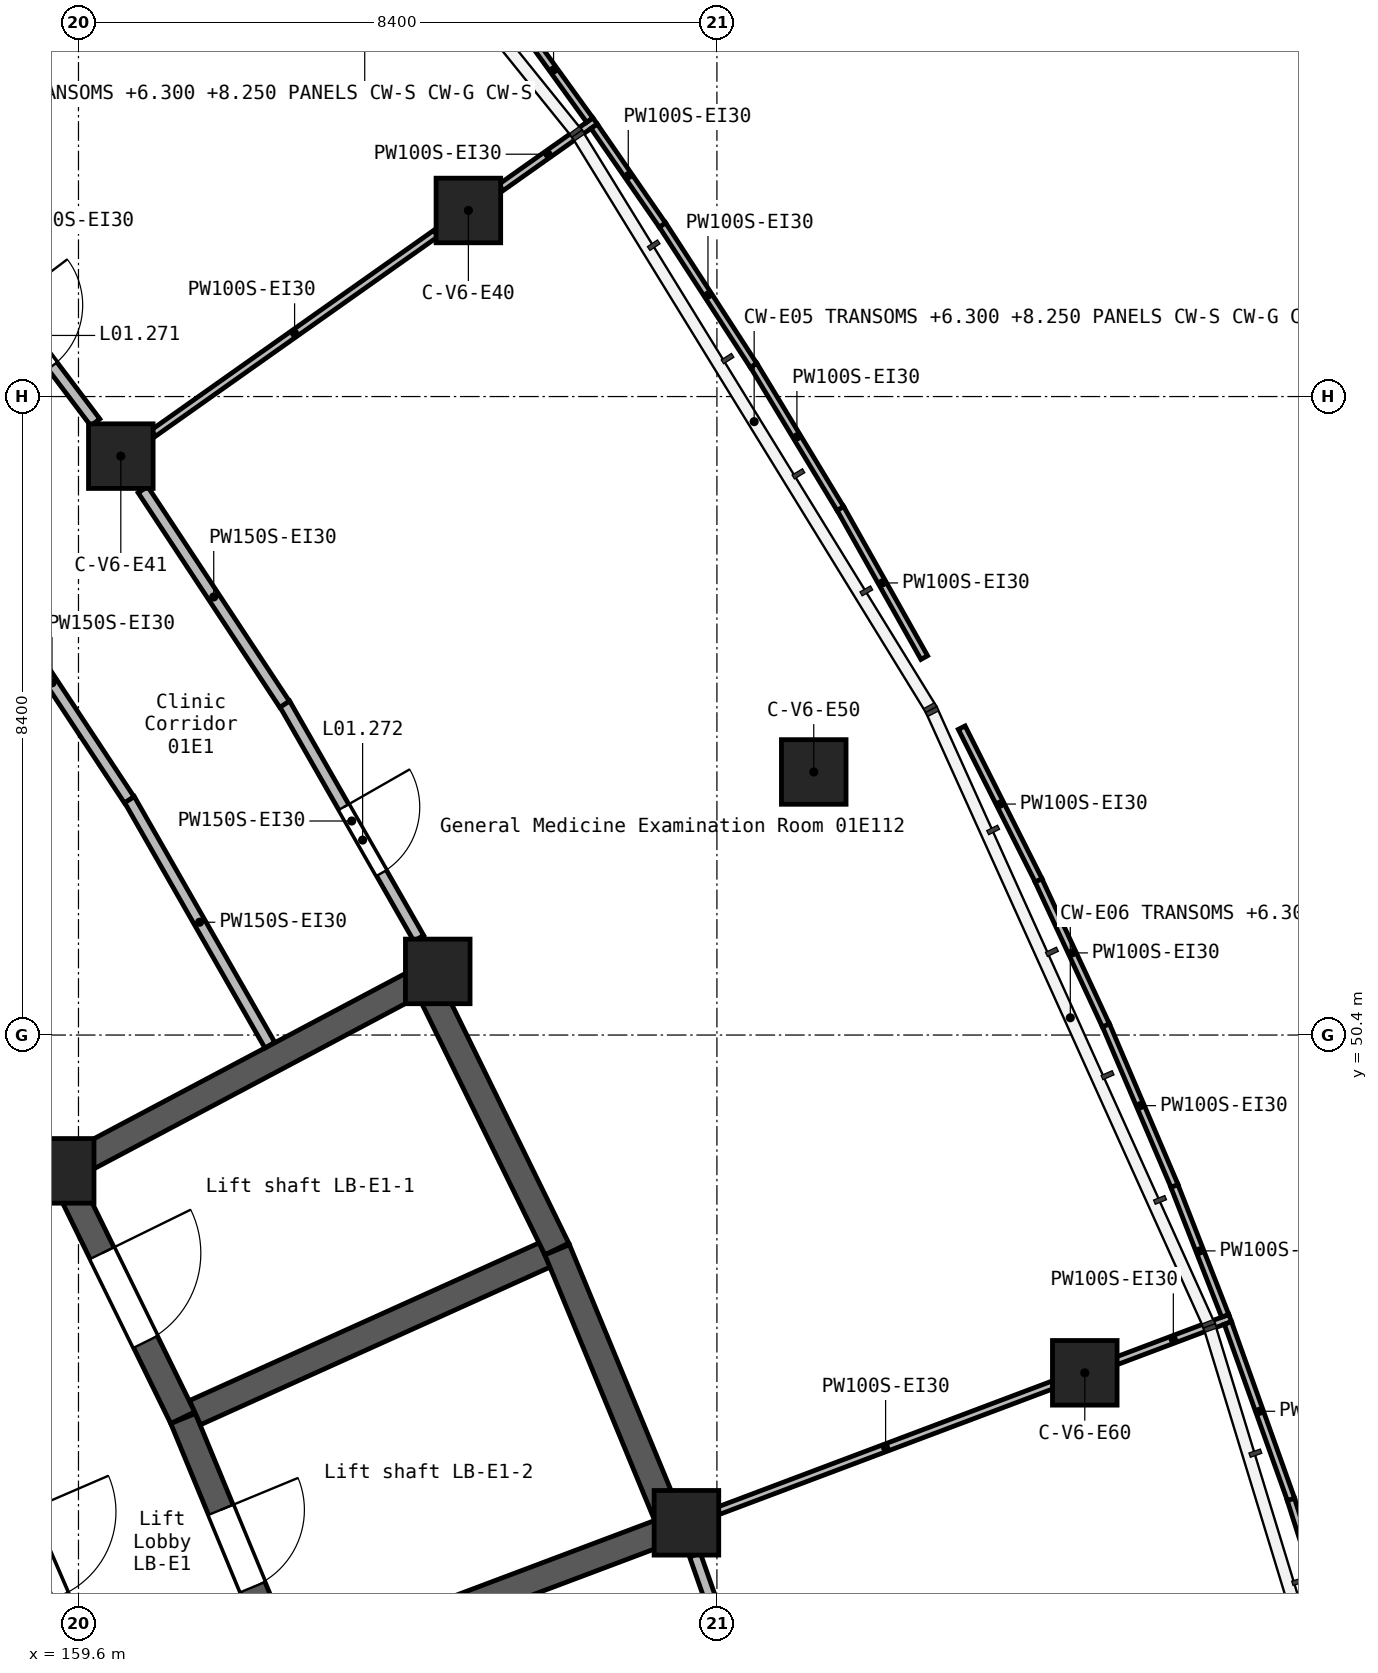
"""IFC4 building model, lengths in metres.
Left out: names, types, materials, properties, quantities, classifications, styles, units other than length and angle.
Written with IfcOpenShell. Run it as: python <this file> out.ifc"""

import sys

from ifc_helpers import new_model, si_unit, direction, frame, frame_2d, origin, origin_2d, place, context, subcontext, project, spatial, rectangle, extrude, element, fill, save


model = new_model("IFC4")
c1 = context("Model", 3, precision=1e-05, world=origin(), true_north=direction((0.0, 1.0)))
c2 = subcontext(c1, "Body", "Model", "MODEL_VIEW")
j1 = project(units=[si_unit("LENGTHUNIT", "METRE"), si_unit("PLANEANGLEUNIT", "RADIAN")], contexts=[c1])
p1 = place(None, origin())
s1 = spatial("IfcSite", under=j1, at=p1, CompositionType="ELEMENT")
p2 = place(p1, origin())
s2 = spatial("IfcBuilding", under=s1, at=p2, CompositionType="ELEMENT")
p3 = place(p2, frame((0.0, 0.0, 5.4)))
s3 = spatial("IfcBuildingStorey", under=s2, at=p3, CompositionType="ELEMENT", Elevation=5.4)
for number, where, z_axis, x_axis in (
    (1, (159.379, 48.613, 0.0), (0.0, 0.0, 1.0), (1.0, 0.0, 0.0)),
    (2, (160.157, 58.016, 0.0), (0.0, 0.0, 1.0), (1.0, 0.0, 0.0)),
    (3, (164.327, 51.237, 0.0), (0.0, 0.0, 1.0), (1.0, 0.0, 0.0)),
    (4, (164.73, 61.248, 0.0), (0.0, 0.0, 1.0), (1.0, 0.0, 0.0)),
    (5, (167.599, 43.983, 0.0), (0.0, 0.0, 1.0), (1.0, 0.0, 0.0)),
    (6, (169.274, 53.861, 0.0), (0.0, 0.0, 1.0), (1.0, 0.0, 0.0)),
    (7, (172.84, 45.956, 0.0), (0.0, 0.0, 1.0), (1.0, 0.0, 0.0)),
):
    element("IfcColumn", number, at=place(p3, frame(where, z_axis=z_axis, x_axis=x_axis)), inside=s3, PredefinedType="COLUMN", context=c2, shape_type="SweptSolid", body=[
        extrude(rectangle(XDim=0.85, YDim=0.85, at=origin_2d()), origin(), (0.0, 0.0, 1.0), 4.5),
    ])
p4 = place(p3, frame((159.224, 48.531, 0.0), z_axis=(0.0, 0.0, 1.0), x_axis=(0.883393138637, 0.468632652094, 0.0)))
e8 = element("IfcWall", 8, at=p4, inside=s3, PredefinedType="SHEAR", context=c2, shape_type="SweptSolid", body=[
    extrude(rectangle(XDim=5.751, YDim=0.35, at=frame_2d((2.875, 0.0))), origin(), (0.0, 0.0, 1.0), 4.5),
])
p5 = place(p3, frame((159.456, 48.456, 0.0), z_axis=(0.0, 0.0, 1.0), x_axis=(0.440221126053, -0.89788939195, 0.0)))
e9 = element("IfcWall", 9, at=p5, inside=s3, PredefinedType="SHEAR", context=c2, shape_type="SweptSolid", body=[
    extrude(rectangle(XDim=3.442, YDim=0.35, at=frame_2d((1.721, 0.0))), origin(), (0.0, 0.0, 1.0), 4.5),
])
p6 = place(p5, frame((1.031, 0.0, 0.0)))
e10 = element("IfcOpeningElement", 10, at=p6, cuts=e9, PredefinedType="OPENING", context=c2, shape_type="SweptSolid", body=[
    extrude(rectangle(XDim=1.3, YDim=2.1, at=frame_2d((0.65, 1.05))), frame((0.0, 0.185, 0.0), z_axis=(0.0, -1.0, 0.0), x_axis=(1.0, 0.0, 0.0)), (0.0, 0.0, 1.0), 0.37),
])
p7 = place(p3, frame((160.976, 45.355, 0.0), z_axis=(0.0, 0.0, 1.0), x_axis=(0.381990591944, -0.924166212143, 0.0)))
e11 = element("IfcWall", 11, at=p7, inside=s3, PredefinedType="SHEAR", context=c2, shape_type="SweptSolid", body=[
    extrude(rectangle(XDim=3.443, YDim=0.35, at=frame_2d((1.721, 0.0))), origin(), (0.0, 0.0, 1.0), 4.5),
])
p8 = place(p7, frame((1.3, 0.0, 0.0)))
e12 = element("IfcOpeningElement", 12, at=p8, cuts=e11, PredefinedType="OPENING", context=c2, shape_type="SweptSolid", body=[
    extrude(rectangle(XDim=1.1, YDim=2.1, at=frame_2d((0.55, 1.05))), frame((0.0, 0.185, 0.0), z_axis=(0.0, -1.0, 0.0), x_axis=(1.0, 0.0, 0.0)), (0.0, 0.0, 1.0), 0.37),
])
p9 = place(p3, frame((161.134, 45.432, 0.0), z_axis=(0.0, 0.0, 1.0), x_axis=(0.911564728385, 0.411156595427, 0.0)))
e13 = element("IfcWall", 13, at=p9, inside=s3, PredefinedType="SHEAR", context=c2, shape_type="SweptSolid", body=[
    extrude(rectangle(XDim=5.05, YDim=0.35, at=frame_2d((2.525, 0.0))), origin(), (0.0, 0.0, 1.0), 4.5),
])
p10 = place(p3, frame((162.194, 41.949, 0.0), z_axis=(0.0, 0.0, 1.0), x_axis=(0.935920223106, 0.352212061095, 0.0)))
e14 = element("IfcWall", 14, at=p10, inside=s3, PredefinedType="SHEAR", context=c2, shape_type="SweptSolid", body=[
    extrude(rectangle(XDim=5.75, YDim=0.35, at=frame_2d((2.875, 0.0))), origin(), (0.0, 0.0, 1.0), 4.5),
])
p11 = place(p3, frame((165.894, 47.585, 0.0), z_axis=(0.0, 0.0, 1.0), x_axis=(-0.43992897418, 0.898032570499, 0.0)))
e15 = element("IfcWall", 15, at=p11, inside=s3, PredefinedType="SHEAR", context=c2, shape_type="SweptSolid", body=[
    extrude(rectangle(XDim=3.788, YDim=0.35, at=frame_2d((1.894, 0.0))), origin(), (0.0, 0.0, 1.0), 4.5),
])
p12 = place(p3, frame((167.345, 44.075, 0.0), z_axis=(0.0, 0.0, 1.0), x_axis=(-0.382046231428, 0.924143212415, 0.0)))
e16 = element("IfcWall", 16, at=p12, inside=s3, PredefinedType="SHEAR", context=c2, shape_type="SweptSolid", body=[
    extrude(rectangle(XDim=3.788, YDim=0.35, at=frame_2d((1.894, 0.0))), origin(), (0.0, 0.0, 1.0), 4.5),
])
p13 = place(p3, frame((158.747, 44.465, 0.0), z_axis=(0.0, 0.0, 1.0), x_axis=(0.396322487651, -0.918111368943, 0.0)))
e17 = element("IfcWall", 17, at=p13, inside=s3, PredefinedType="SOLIDWALL", context=c2, shape_type="SweptSolid", body=[
    extrude(rectangle(XDim=1.936, YDim=0.2, at=frame_2d((0.968, 0.0))), origin(), (0.0, 0.0, 1.0), 4.15),
])
p14 = place(p13, frame((0.368, 0.0, 0.0)))
e18 = element("IfcOpeningElement", 18, at=p14, cuts=e17, PredefinedType="OPENING", context=c2, shape_type="SweptSolid", body=[
    extrude(rectangle(XDim=1.2, YDim=2.1, at=frame_2d((0.6, 1.05))), frame((0.0, 0.11, 0.0), z_axis=(0.0, -1.0, 0.0), x_axis=(1.0, 0.0, 0.0)), (0.0, 0.0, 1.0), 0.22),
])
p15 = place(p3, frame((162.313, 54.758, 0.0), z_axis=(0.0, 0.0, 1.0), x_axis=(0.496582798362, -0.867989357291, 0.0)))
e19 = element("IfcWall", 19, at=p15, inside=s3, PredefinedType="PARTITIONING", context=c2, shape_type="SweptSolid", body=[
    extrude(rectangle(XDim=3.553, YDim=0.15, at=frame_2d((1.777, 0.0))), origin(), (0.0, 0.0, 1.0), 4.15),
])
p16 = place(p15, frame((1.566, 0.0, 0.0)))
e20 = element("IfcOpeningElement", 20, at=p16, cuts=e19, PredefinedType="OPENING", context=c2, shape_type="SweptSolid", body=[
    extrude(rectangle(XDim=1.0, YDim=2.1, at=frame_2d((0.5, 1.05))), frame((0.0, 0.085, 0.0), z_axis=(0.0, -1.0, 0.0), x_axis=(1.0, 0.0, 0.0)), (0.0, 0.0, 1.0), 0.17),
])
p17 = place(p3, frame((160.448, 57.575, 0.0), z_axis=(0.0, 0.0, 1.0), x_axis=(0.550814058929, -0.834627984485, 0.0)))
e21 = element("IfcWall", 21, at=p17, inside=s3, PredefinedType="PARTITIONING", context=c2, shape_type="SweptSolid", body=[
    extrude(rectangle(XDim=3.383, YDim=0.15, at=frame_2d((1.692, 0.0))), origin(), (0.0, 0.0, 1.0), 4.15),
])
p18 = place(p3, frame((157.712, 61.252, 0.0), z_axis=(0.0, 0.0, 1.0), x_axis=(0.602876520925, -0.797834506974, 0.0)))
e22 = element("IfcWall", 22, at=p18, inside=s3, PredefinedType="PARTITIONING", context=c2, shape_type="SweptSolid", body=[
    extrude(rectangle(XDim=3.499, YDim=0.15, at=frame_2d((1.75, 0.0))), origin(), (0.0, 0.0, 1.0), 4.15),
])
p19 = place(p18, frame((1.565, 0.0, 0.0)))
e23 = element("IfcOpeningElement", 23, at=p19, cuts=e22, PredefinedType="OPENING", context=c2, shape_type="SweptSolid", body=[
    extrude(rectangle(XDim=1.0, YDim=2.1, at=frame_2d((0.5, 1.05))), frame((0.0, 0.085, 0.0), z_axis=(0.0, -1.0, 0.0), x_axis=(1.0, 0.0, 0.0)), (0.0, 0.0, 1.0), 0.17),
])
p20 = place(p3, frame((167.711, 43.559, 0.0), z_axis=(0.0, 0.0, 1.0), x_axis=(0.330491338893, -0.9438090246, 0.0)))
e24 = element("IfcWall", 24, at=p20, inside=s3, PredefinedType="PARTITIONING", context=c2, shape_type="SweptSolid", body=[
    extrude(rectangle(XDim=3.473, YDim=0.15, at=frame_2d((1.736, 0.0))), origin(), (0.0, 0.0, 1.0), 4.15),
])
p21 = place(p3, frame((160.269, 53.501, 0.0), z_axis=(0.0, 0.0, 1.0), x_axis=(0.496371795626, -0.8681100394, 0.0)))
e25 = element("IfcWall", 25, at=p21, inside=s3, PredefinedType="PARTITIONING", context=c2, shape_type="SweptSolid", body=[
    extrude(rectangle(XDim=3.726, YDim=0.15, at=frame_2d((1.863, 0.0))), origin(), (0.0, 0.0, 1.0), 4.15),
])
p22 = place(p3, frame((158.236, 56.571, 0.0), z_axis=(0.0, 0.0, 1.0), x_axis=(0.550996276136, -0.834507701393, 0.0)))
e26 = element("IfcWall", 26, at=p22, inside=s3, PredefinedType="PARTITIONING", context=c2, shape_type="SweptSolid", body=[
    extrude(rectangle(XDim=3.687, YDim=0.15, at=frame_2d((1.843, 0.0))), origin(), (0.0, 0.0, 1.0), 4.15),
])
p23 = place(p3, frame((168.016, 44.14, 0.0), z_axis=(0.0, 0.0, 1.0), x_axis=(0.935850976525, 0.352396012659, 0.0)))
e27 = element("IfcWall", 27, at=p23, inside=s3, PredefinedType="PARTITIONING", context=c2, shape_type="SweptSolid", body=[
    extrude(rectangle(XDim=4.708, YDim=0.1, at=frame_2d((2.354, 0.0))), origin(), (0.0, 0.0, 1.0), 4.15),
])
p24 = place(p3, frame((173.257, 46.114, 0.0), z_axis=(0.0, 0.0, 1.0), x_axis=(0.93586999438, 0.35234550319, 0.0)))
e28 = element("IfcWall", 28, at=p24, inside=s3, PredefinedType="PARTITIONING", context=c2, shape_type="SweptSolid", body=[
    extrude(rectangle(XDim=1.598, YDim=0.1, at=frame_2d((0.799, 0.0))), origin(), (0.0, 0.0, 1.0), 4.15),
])
p25 = place(p3, frame((160.585, 58.319, 0.0), z_axis=(0.0, 0.0, 1.0), x_axis=(0.816630246187, 0.577161191534, 0.0)))
e29 = element("IfcWall", 29, at=p25, inside=s3, PredefinedType="PARTITIONING", context=c2, shape_type="SweptSolid", body=[
    extrude(rectangle(XDim=4.551, YDim=0.1, at=frame_2d((2.275, 0.0))), origin(), (0.0, 0.0, 1.0), 4.15),
])
p26 = place(p3, frame((165.158, 61.551, 0.0), z_axis=(0.0, 0.0, 1.0), x_axis=(0.816659911288, 0.577119215842, 0.0)))
e30 = element("IfcWall", 30, at=p26, inside=s3, PredefinedType="PARTITIONING", context=c2, shape_type="SweptSolid", body=[
    extrude(rectangle(XDim=1.517, YDim=0.1, at=frame_2d((0.758, 0.0))), origin(), (0.0, 0.0, 1.0), 4.15),
])
p27 = place(p3, frame((174.723, 46.611, 0.0), z_axis=(0.0, 0.0, 1.0), x_axis=(0.336762779461, -0.94158952329, 0.0)))
e31 = element("IfcWall", 31, at=p27, inside=s3, PredefinedType="PARTITIONING", context=c2, shape_type="SweptSolid", body=[
    extrude(rectangle(XDim=2.466, YDim=0.1, at=frame_2d((1.233, 0.0))), origin(), (0.0, 0.0, 1.0), 4.15),
])
p28 = place(p3, frame((169.624, 57.33, 0.0), z_axis=(0.0, 0.0, 1.0), x_axis=(0.490245804698, -0.871584219095, 0.0)))
e32 = element("IfcWall", 32, at=p28, inside=s3, PredefinedType="PARTITIONING", context=c2, shape_type="SweptSolid", body=[
    extrude(rectangle(XDim=2.253, YDim=0.1, at=frame_2d((1.126, 0.0))), origin(), (0.0, 0.0, 1.0), 4.15),
])
p29 = place(p3, frame((168.482, 59.213, 0.0), z_axis=(0.0, 0.0, 1.0), x_axis=(0.517604223091, -0.855620165867, 0.0)))
e33 = element("IfcWall", 33, at=p29, inside=s3, PredefinedType="PARTITIONING", context=c2, shape_type="SweptSolid", body=[
    extrude(rectangle(XDim=2.204, YDim=0.1, at=frame_2d((1.102, 0.0))), origin(), (0.0, 0.0, 1.0), 4.15),
])
p30 = place(p3, frame((167.283, 61.059, 0.0), z_axis=(0.0, 0.0, 1.0), x_axis=(0.544248024884, -0.838924363342, 0.0)))
e34 = element("IfcWall", 34, at=p30, inside=s3, PredefinedType="PARTITIONING", context=c2, shape_type="SweptSolid", body=[
    extrude(rectangle(XDim=2.203, YDim=0.1, at=frame_2d((1.102, 0.0))), origin(), (0.0, 0.0, 1.0), 4.15),
])
p31 = place(p3, frame((171.221, 54.444, 0.0), z_axis=(0.0, 0.0, 1.0), x_axis=(0.449727785834, -0.893165672565, 0.0)))
e35 = element("IfcWall", 35, at=p31, inside=s3, PredefinedType="PARTITIONING", context=c2, shape_type="SweptSolid", body=[
    extrude(rectangle(XDim=2.251, YDim=0.1, at=frame_2d((1.125, 0.0))), origin(), (0.0, 0.0, 1.0), 4.15),
])
p32 = place(p3, frame((173.118, 50.529, 0.0), z_axis=(0.0, 0.0, 1.0), x_axis=(0.392535641105, -0.919736794122, 0.0)))
e36 = element("IfcWall", 36, at=p32, inside=s3, PredefinedType="PARTITIONING", context=c2, shape_type="SweptSolid", body=[
    extrude(rectangle(XDim=2.301, YDim=0.1, at=frame_2d((1.15, 0.0))), origin(), (0.0, 0.0, 1.0), 4.15),
])
p33 = place(p3, frame((175.552, 44.29, 0.0), z_axis=(0.0, 0.0, 1.0), x_axis=(0.304461914253, -0.952524510325, 0.0)))
e37 = element("IfcWall", 37, at=p33, inside=s3, PredefinedType="PARTITIONING", context=c2, shape_type="SweptSolid", body=[
    extrude(rectangle(XDim=2.202, YDim=0.1, at=frame_2d((1.101, 0.0))), origin(), (0.0, 0.0, 1.0), 4.15),
])
p34 = place(p3, frame((172.231, 52.434, 0.0), z_axis=(0.0, 0.0, 1.0), x_axis=(0.42144215668, -0.906855285353, 0.0)))
e38 = element("IfcWall", 38, at=p34, inside=s3, PredefinedType="PARTITIONING", context=c2, shape_type="SweptSolid", body=[
    extrude(rectangle(XDim=2.103, YDim=0.1, at=frame_2d((1.051, 0.0))), origin(), (0.0, 0.0, 1.0), 4.15),
])
p35 = place(p3, frame((174.02, 48.414, 0.0), z_axis=(0.0, 0.0, 1.0), x_axis=(0.364148326517, -0.931340966722, 0.0)))
e39 = element("IfcWall", 39, at=p35, inside=s3, PredefinedType="PARTITIONING", context=c2, shape_type="SweptSolid", body=[
    extrude(rectangle(XDim=1.834, YDim=0.1, at=frame_2d((0.917, 0.0))), origin(), (0.0, 0.0, 1.0), 4.15),
])
p36 = place(p3, frame((166.385, 62.355, 0.0), z_axis=(0.0, 0.0, 1.0), x_axis=(0.568646920536, -0.822581716163, 0.0)))
e40 = element("IfcWall", 40, at=p36, inside=s3, PredefinedType="PARTITIONING", context=c2, shape_type="SweptSolid", body=[
    extrude(rectangle(XDim=1.579, YDim=0.1, at=frame_2d((0.789, 0.0))), origin(), (0.0, 0.0, 1.0), 4.15),
])
p37 = place(p3, frame((165.375, 63.755, 0.0), z_axis=(0.0, 0.0, 1.0), x_axis=(0.585622227381, -0.810584114573, 0.0)))
e41 = element("IfcWall", 41, at=p37, inside=s3, PredefinedType="PARTITIONING", context=c2, shape_type="SweptSolid", body=[
    extrude(rectangle(XDim=1.625, YDim=0.1, at=frame_2d((0.812, 0.0))), origin(), (0.0, 0.0, 1.0), 4.15),
])
p38 = place(p14, origin())
e42 = element("IfcDoor", 42, at=p38, inside=s3, OperationType="SINGLE_SWING_LEFT", PredefinedType="DOOR", context=c2, shape_type="SweptSolid", body=[
    extrude(rectangle(XDim=1.2, YDim=2.1, at=frame_2d((0.6, 1.05))), frame((0.0, 0.025, 0.0), z_axis=(0.0, -1.0, 0.0), x_axis=(1.0, 0.0, 0.0)), (0.0, 0.0, 1.0), 0.05),
])
fill(e18, e42)
p39 = place(p19, origin())
e43 = element("IfcDoor", 43, at=p39, inside=s3, OperationType="SINGLE_SWING_RIGHT", PredefinedType="DOOR", context=c2, shape_type="SweptSolid", body=[
    extrude(rectangle(XDim=1.0, YDim=2.1, at=frame_2d((0.5, 1.05))), frame((0.0, 0.025, 0.0), z_axis=(0.0, -1.0, 0.0), x_axis=(1.0, 0.0, 0.0)), (0.0, 0.0, 1.0), 0.05),
])
fill(e23, e43)
p40 = place(p16, origin())
e44 = element("IfcDoor", 44, at=p40, inside=s3, OperationType="SINGLE_SWING_RIGHT", PredefinedType="DOOR", context=c2, shape_type="SweptSolid", body=[
    extrude(rectangle(XDim=1.0, YDim=2.1, at=frame_2d((0.5, 1.05))), frame((0.0, 0.025, 0.0), z_axis=(0.0, -1.0, 0.0), x_axis=(1.0, 0.0, 0.0)), (0.0, 0.0, 1.0), 0.05),
])
fill(e20, e44)
p41 = place(p6, origin())
e45 = element("IfcDoor", 45, at=p41, inside=s3, OperationType="DOUBLE_DOOR_SLIDING", PredefinedType="DOOR", context=c2, shape_type="SweptSolid", body=[
    extrude(rectangle(XDim=1.3, YDim=2.1, at=frame_2d((0.65, 1.05))), frame((0.0, 0.025, 0.0), z_axis=(0.0, -1.0, 0.0), x_axis=(1.0, 0.0, 0.0)), (0.0, 0.0, 1.0), 0.05),
])
fill(e10, e45)
p42 = place(p8, origin())
e46 = element("IfcDoor", 46, at=p42, inside=s3, OperationType="DOUBLE_DOOR_SLIDING", PredefinedType="DOOR", context=c2, shape_type="SweptSolid", body=[
    extrude(rectangle(XDim=1.1, YDim=2.1, at=frame_2d((0.55, 1.05))), frame((0.0, 0.025, 0.0), z_axis=(0.0, -1.0, 0.0), x_axis=(1.0, 0.0, 0.0)), (0.0, 0.0, 1.0), 0.05),
])
fill(e12, e46)
save(model, sys.argv[1])
